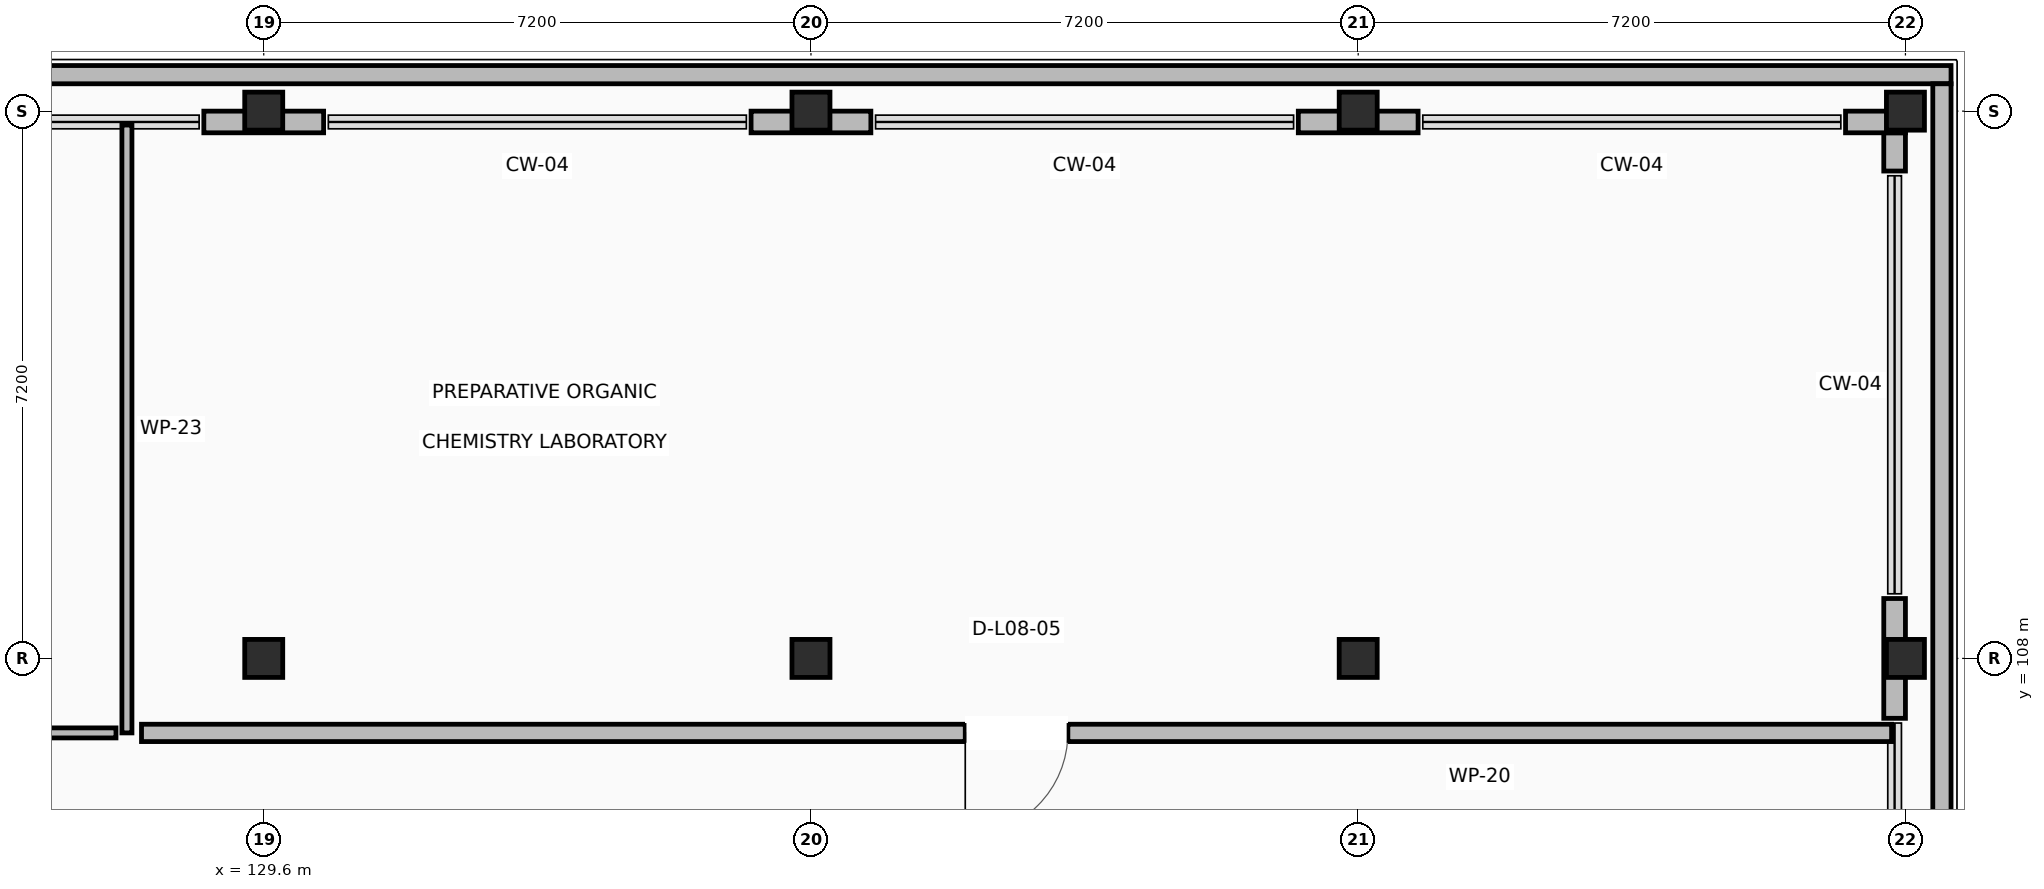
"""IFC4 building model, lengths in metres.
Left out: names, types, materials, properties, quantities, classifications, styles, units other than length and angle.
Written with IfcOpenShell. Run it as: python <this file> out.ifc"""

import sys

from ifc_helpers import new_model, si_unit, direction, frame, frame_2d, origin, origin_2d, place, context, subcontext, project, spatial, rectangle, extrude, element, fill, save


model = new_model("IFC4")
c1 = context("Model", 3, precision=1e-05, world=origin(), true_north=direction((0.0, 1.0)))
c2 = subcontext(c1, "Body", "Model", "MODEL_VIEW")
j1 = project(units=[si_unit("LENGTHUNIT", "METRE"), si_unit("PLANEANGLEUNIT", "RADIAN")], contexts=[c1])
p1 = place(None, origin())
s1 = spatial("IfcSite", under=j1, at=p1, CompositionType="ELEMENT")
p2 = place(p1, origin())
s2 = spatial("IfcBuilding", under=s1, at=p2, CompositionType="ELEMENT")
p3 = place(p2, frame((0.0, 0.0, 35.4)))
s3 = spatial("IfcBuildingStorey", under=s2, at=p3, CompositionType="ELEMENT", Elevation=35.4)
for number, where, z_axis, x_axis in (
    (1, (129.6, 108.0, 0.0), (0.0, 0.0, 1.0), (1.0, 0.0, 0.0)),
    (2, (129.6, 115.2, 0.0), (0.0, 0.0, 1.0), (1.0, 0.0, 0.0)),
    (3, (136.8, 108.0, 0.0), (0.0, 0.0, 1.0), (1.0, 0.0, 0.0)),
    (4, (136.8, 115.2, 0.0), (0.0, 0.0, 1.0), (1.0, 0.0, 0.0)),
    (5, (144.0, 108.0, 0.0), (0.0, 0.0, 1.0), (1.0, 0.0, 0.0)),
    (6, (144.0, 115.2, 0.0), (0.0, 0.0, 1.0), (1.0, 0.0, 0.0)),
    (7, (151.2, 108.0, 0.0), (0.0, 0.0, 1.0), (1.0, 0.0, 0.0)),
    (8, (151.2, 115.2, 0.0), (0.0, 0.0, 1.0), (1.0, 0.0, 0.0)),
):
    element("IfcColumn", number, at=place(p3, frame(where, z_axis=z_axis, x_axis=x_axis)), inside=s3, PredefinedType="COLUMN", context=c2, shape_type="SweptSolid", body=[
        extrude(rectangle(XDim=0.5, YDim=0.5, at=origin_2d()), origin(), (0.0, 0.0, 1.0), 3.92),
    ])
p4 = place(p3, frame((151.058, 107.212, 0.0), z_axis=(0.0, 0.0, 1.0), x_axis=(0.0, 1.0, 0.0)))
e9 = element("IfcWall", 9, at=p4, inside=s3, PredefinedType="STANDARD", context=c2, shape_type="SweptSolid", body=[
    extrude(rectangle(XDim=1.576, YDim=0.285, at=frame_2d((0.788, 0.0))), origin(), (0.0, 0.0, 1.0), 2.96),
])
p5 = place(p3, frame((151.058, 114.412, 0.0), z_axis=(0.0, 0.0, 1.0), x_axis=(0.0, 1.0, 0.0)))
e10 = element("IfcWall", 10, at=p5, inside=s3, PredefinedType="STANDARD", context=c2, shape_type="SweptSolid", body=[
    extrude(rectangle(XDim=0.503, YDim=0.285, at=frame_2d((0.251, 0.0))), origin(), (0.0, 0.0, 1.0), 2.96),
])
p6 = place(p3, frame((151.2, 115.058, 0.0), z_axis=(0.0, 0.0, 1.0), x_axis=(-1.0, 0.0, 0.0)))
e11 = element("IfcWall", 11, at=p6, inside=s3, PredefinedType="STANDARD", context=c2, shape_type="SweptSolid", body=[
    extrude(rectangle(XDim=0.788, YDim=0.285, at=frame_2d((0.394, 0.0))), origin(), (0.0, 0.0, 1.0), 2.96),
])
p7 = place(p3, frame((144.788, 115.058, 0.0), z_axis=(0.0, 0.0, 1.0), x_axis=(-1.0, 0.0, 0.0)))
e12 = element("IfcWall", 12, at=p7, inside=s3, PredefinedType="STANDARD", context=c2, shape_type="SweptSolid", body=[
    extrude(rectangle(XDim=1.576, YDim=0.285, at=frame_2d((0.788, 0.0))), origin(), (0.0, 0.0, 1.0), 2.96),
])
for number, where, z_axis, x_axis in (
    (13, (137.588, 115.058, 0.0), (0.0, 0.0, 1.0), (-1.0, 0.0, 0.0)),
    (14, (130.388, 115.058, 0.0), (0.0, 0.0, 1.0), (-1.0, 0.0, 0.0)),
):
    element("IfcWall", number, at=place(p3, frame(where, z_axis=z_axis, x_axis=x_axis)), inside=s3, PredefinedType="STANDARD", context=c2, shape_type="SweptSolid", body=[
        extrude(rectangle(XDim=1.576, YDim=0.285, at=frame_2d((0.788, 0.0))), origin(), (0.0, 0.0, 1.0), 2.96),
    ])
p8 = place(p3, frame((85.8, 115.68, 0.0), z_axis=(0.0, 0.0, 1.0), x_axis=(1.0, 0.0, 0.0)))
e15 = element("IfcWall", 15, at=p8, inside=s3, PredefinedType="PARAPET", context=c2, shape_type="SweptSolid", body=[
    extrude(rectangle(XDim=66.0, YDim=0.24, at=frame_2d((33.0, 0.0))), origin(), (0.0, 0.0, 1.0), 1.12),
])
p9 = place(p3, frame((151.68, 115.56, 0.0), z_axis=(0.0, 0.0, 1.0), x_axis=(0.0, -1.0, 0.0)))
e16 = element("IfcWall", 16, at=p9, inside=s3, PredefinedType="PARAPET", context=c2, shape_type="SweptSolid", body=[
    extrude(rectangle(XDim=21.36, YDim=0.24, at=frame_2d((10.68, 0.0))), origin(), (0.0, 0.0, 1.0), 1.12),
])
p10 = place(p3, frame((127.8, 115.017, 0.0), z_axis=(0.0, 0.0, 1.0), x_axis=(0.0, -1.0, 0.0)))
e17 = element("IfcWall", 17, at=p10, inside=s3, PredefinedType="PARTITIONING", context=c2, shape_type="SweptSolid", body=[
    extrude(rectangle(XDim=7.997, YDim=0.132, at=frame_2d((3.999, 0.0))), origin(), (0.0, 0.0, 1.0), 2.96),
])
p11 = place(p3, frame((127.656, 107.02, 0.0), z_axis=(0.0, 0.0, 1.0), x_axis=(-1.0, 0.0, 0.0)))
e18 = element("IfcWall", 18, at=p11, inside=s3, PredefinedType="PARTITIONING", context=c2, shape_type="SweptSolid", body=[
    extrude(rectangle(XDim=21.49, YDim=0.132, at=frame_2d((10.745, 0.0))), origin(), (0.0, 0.0, 1.0), 2.96),
])
p12 = place(p11, frame((10.255, 0.0, 0.0)))
e19 = element("IfcOpeningElement", 19, at=p12, cuts=e18, PredefinedType="OPENING", context=c2, shape_type="SweptSolid", body=[
    extrude(rectangle(XDim=0.98, YDim=2.1, at=frame_2d((0.49, 1.05))), frame((0.0, 0.076, 0.0), z_axis=(0.0, -1.0, 0.0), x_axis=(1.0, 0.0, 0.0)), (0.0, 0.0, 1.0), 0.152),
])
p13 = place(p3, frame((151.018, 107.02, 0.0), z_axis=(0.0, 0.0, 1.0), x_axis=(-1.0, 0.0, 0.0)))
e20 = element("IfcWall", 20, at=p13, inside=s3, PredefinedType="PARTITIONING", context=c2, shape_type="SweptSolid", body=[
    extrude(rectangle(XDim=23.026, YDim=0.228, at=frame_2d((11.513, 0.0))), origin(), (0.0, 0.0, 1.0), 2.96),
])
p14 = place(p13, frame((10.838, 0.0, 0.0)))
e21 = element("IfcOpeningElement", 21, at=p14, cuts=e20, PredefinedType="OPENING", context=c2, shape_type="SweptSolid", body=[
    extrude(rectangle(XDim=1.35, YDim=2.15, at=frame_2d((0.675, 1.075))), frame((0.0, 0.124, 0.0), z_axis=(0.0, -1.0, 0.0), x_axis=(1.0, 0.0, 0.0)), (0.0, 0.0, 1.0), 0.248),
])
p15 = place(p14, origin())
e22 = element("IfcDoor", 22, at=p15, inside=s3, OperationType="SINGLE_SWING_RIGHT", PredefinedType="DOOR", context=c2, shape_type="SweptSolid", body=[
    extrude(rectangle(XDim=1.35, YDim=2.15, at=frame_2d((0.675, 1.075))), frame((0.0, 0.025, 0.0), z_axis=(0.0, -1.0, 0.0), x_axis=(1.0, 0.0, 0.0)), (0.0, 0.0, 1.0), 0.05),
])
fill(e21, e22)
save(model, sys.argv[1])
